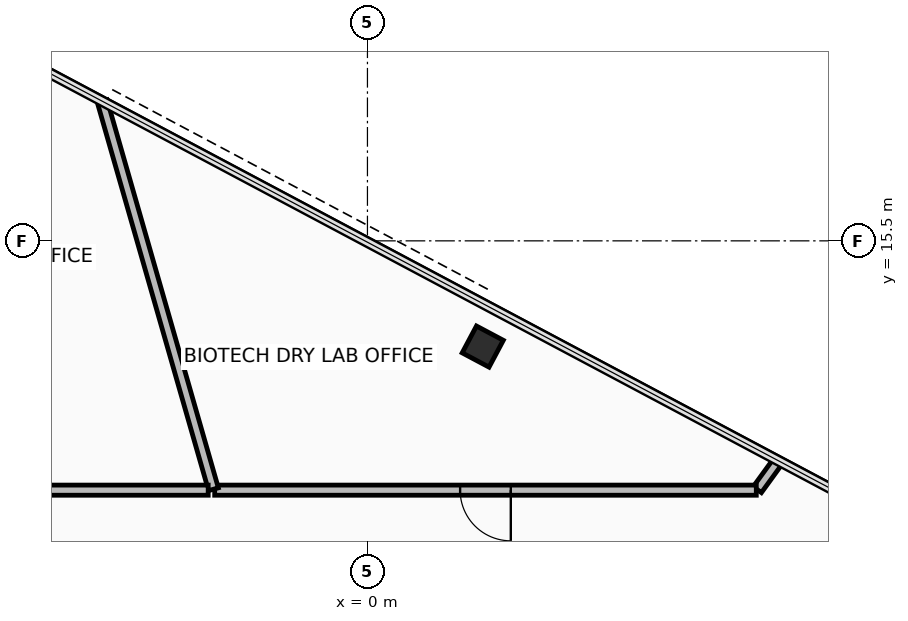
"""IFC4 building model, lengths in metres.
Left out: names, types, materials, properties, quantities, classifications, styles, units other than length and angle.
Written with IfcOpenShell. Run it as: python <this file> out.ifc"""

import sys

from ifc_helpers import new_model, si_unit, direction, frame, frame_2d, origin, origin_2d, place, context, subcontext, project, spatial, rectangle, hollow_rectangle, extrude, element, fill, save


model = new_model("IFC4")
c1 = context("Model", 3, precision=1e-05, world=origin(), true_north=direction((0.0, 1.0)))
c2 = subcontext(c1, "Body", "Model", "MODEL_VIEW")
j1 = project(units=[si_unit("LENGTHUNIT", "METRE"), si_unit("PLANEANGLEUNIT", "RADIAN")], contexts=[c1])
p1 = place(None, origin())
s1 = spatial("IfcSite", under=j1, at=p1, CompositionType="ELEMENT")
p2 = place(p1, origin())
s2 = spatial("IfcBuilding", under=s1, at=p2, CompositionType="ELEMENT")
p3 = place(p2, frame((0.0, 0.0, 156.8)))
s3 = spatial("IfcBuildingStorey", under=s2, at=p3, CompositionType="ELEMENT", Elevation=156.8)
p4 = place(p3, frame((2.276, 13.414, 0.0), z_axis=(0.0, 0.0, 1.0), x_axis=(-0.88294841224, 0.469470021751, 0.0)))
e1 = element("IfcColumn", 1, at=p4, inside=s3, PredefinedType="COLUMN", context=c2, shape_type="SweptSolid", body=[
    extrude(hollow_rectangle(XDim=0.6, YDim=0.6, WallThickness=0.036, at=origin_2d()), origin(), (0.0, 0.0, 1.0), 3.6),
])
p5 = place(p3, frame((8.092, 11.138, 0.0), z_axis=(0.0, 0.0, 1.0), x_axis=(-0.587871434296, -0.80895437247, 0.0)))
e2 = element("IfcWall", 2, at=p5, inside=s3, PredefinedType="PARTITIONING", context=c2, shape_type="SweptSolid", body=[
    extrude(rectangle(XDim=0.677, YDim=0.2, at=frame_2d((0.338, 0.0))), origin(), (0.0, 0.0, 1.0), 2.705),
])
p6 = place(p3, frame((7.674, 10.58, 0.0), z_axis=(0.0, 0.0, 1.0), x_axis=(-1.0, 0.0, 0.0)))
e3 = element("IfcWall", 3, at=p6, inside=s3, PredefinedType="PARTITIONING", context=c2, shape_type="SweptSolid", body=[
    extrude(rectangle(XDim=10.689, YDim=0.2, at=frame_2d((5.344, 0.0))), origin(), (0.0, 0.0, 1.0), 2.705),
])
p7 = place(p6, frame((4.845, 0.0, 0.0)))
e4 = element("IfcOpeningElement", 4, at=p7, cuts=e3, PredefinedType="OPENING", context=c2, shape_type="SweptSolid", body=[
    extrude(rectangle(XDim=1.0, YDim=2.15, at=frame_2d((0.5, 1.075))), frame((0.0, 0.11, 0.0), z_axis=(0.0, -1.0, 0.0), x_axis=(1.0, 0.0, 0.0)), (0.0, 0.0, 1.0), 0.22),
])
p8 = place(p3, frame((-3.039, 10.598, 0.0), z_axis=(0.0, 0.0, 1.0), x_axis=(-0.275619537282, 0.961266805142, 0.0)))
e5 = element("IfcWall", 5, at=p8, inside=s3, PredefinedType="PARTITIONING", context=c2, shape_type="SweptSolid", body=[
    extrude(rectangle(XDim=7.967, YDim=0.2, at=frame_2d((3.983, 0.0))), origin(), (0.0, 0.0, 1.0), 2.705),
])
p9 = place(p3, frame((-3.143, 10.58, 0.0), z_axis=(0.0, 0.0, 1.0), x_axis=(-1.0, 0.0, 0.0)))
e6 = element("IfcWall", 6, at=p9, inside=s3, PredefinedType="PARTITIONING", context=c2, shape_type="SweptSolid", body=[
    extrude(rectangle(XDim=8.736, YDim=0.2, at=frame_2d((4.368, 0.0))), origin(), (0.0, 0.0, 1.0), 2.755),
])
p10 = place(p9, frame((3.868, 0.0, 0.0)))
e7 = element("IfcOpeningElement", 7, at=p10, cuts=e6, PredefinedType="OPENING", context=c2, shape_type="SweptSolid", body=[
    extrude(rectangle(XDim=1.0, YDim=2.15, at=frame_2d((0.5, 1.075))), frame((0.0, 0.11, 0.0), z_axis=(0.0, -1.0, 0.0), x_axis=(1.0, 0.0, 0.0)), (0.0, 0.0, 1.0), 0.22),
])
p11 = place(p7, origin())
e8 = element("IfcDoor", 8, at=p11, inside=s3, OperationType="SINGLE_SWING_RIGHT", PredefinedType="DOOR", context=c2, shape_type="SweptSolid", body=[
    extrude(rectangle(XDim=1.0, YDim=2.15, at=frame_2d((0.5, 1.075))), frame((0.0, 0.025, 0.0), z_axis=(0.0, -1.0, 0.0), x_axis=(1.0, 0.0, 0.0)), (0.0, 0.0, 1.0), 0.05),
])
fill(e4, e8)
save(model, sys.argv[1])
